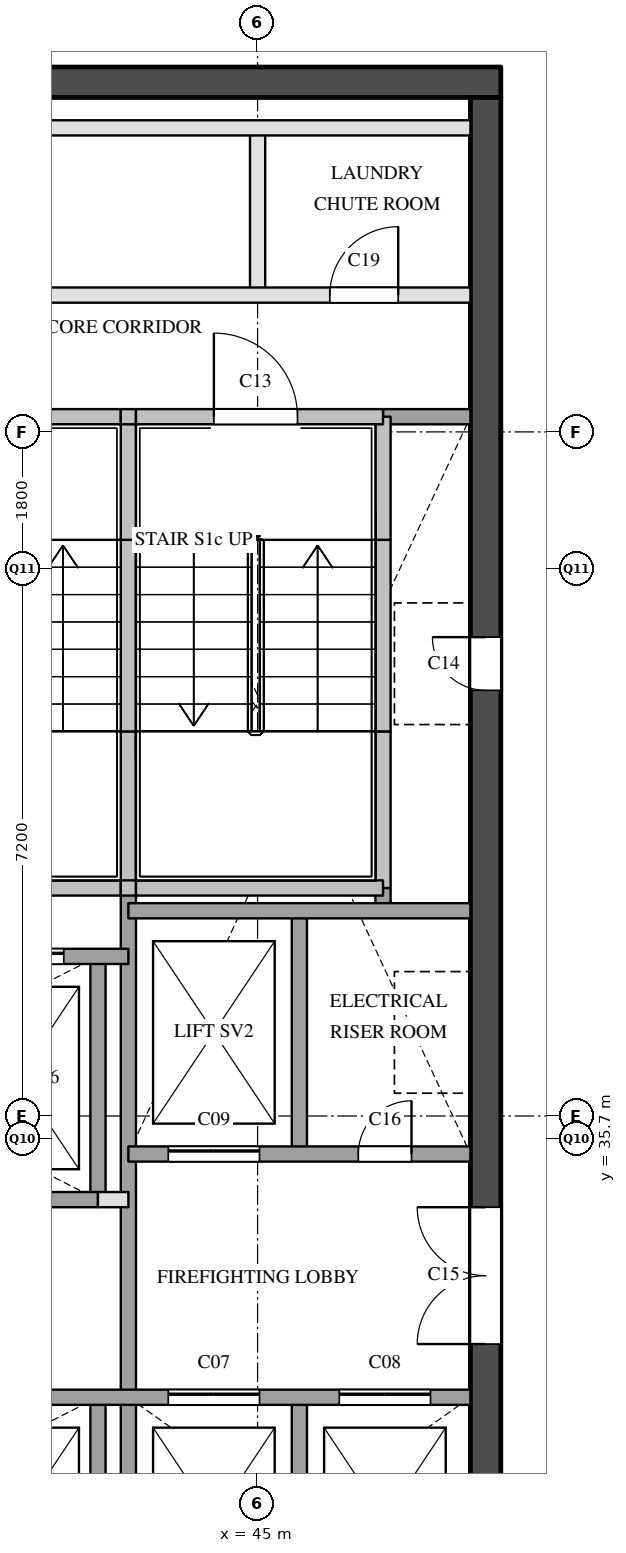
"""IFC4 building model, lengths in metres.
Left out: names, types, materials, properties, quantities, classifications, styles, units other than length and angle.
Written with IfcOpenShell. Run it as: python <this file> out.ifc"""

import sys

from ifc_helpers import new_model, si_unit, direction, frame, frame_2d, origin, place, context, subcontext, project, spatial, rectangle, extrude, element, fill, save


model = new_model("IFC4")
c1 = context("Model", 3, precision=1e-05, world=origin(), true_north=direction((0.0, 1.0)))
c2 = subcontext(c1, "Body", "Model", "MODEL_VIEW")
j1 = project(units=[si_unit("LENGTHUNIT", "METRE"), si_unit("PLANEANGLEUNIT", "RADIAN")], contexts=[c1])
p1 = place(None, origin())
s1 = spatial("IfcSite", under=j1, at=p1, CompositionType="ELEMENT")
p2 = place(p1, origin())
s2 = spatial("IfcBuilding", under=s1, at=p2, CompositionType="ELEMENT")
p3 = place(p2, frame((0.0, 0.0, 285.2)))
s3 = spatial("IfcBuildingStorey", under=s2, at=p3, CompositionType="ELEMENT", Elevation=285.2)
p4 = place(p3, frame((36.2, 49.6, 0.0), z_axis=(0.0, 0.0, 1.0), x_axis=(1.0, 0.0, 0.0)))
e1 = element("IfcWall", 1, at=p4, inside=s3, PredefinedType="SHEAR", context=c2, shape_type="SweptSolid", body=[
    extrude(rectangle(XDim=12.0, YDim=0.4, at=frame_2d((6.0, 0.0))), origin(), (0.0, 0.0, 1.0), 4.7),
])
p5 = place(p3, frame((48.0, 29.1, 0.0), z_axis=(0.0, 0.0, 1.0), x_axis=(0.0, 1.0, 0.0)))
e2 = element("IfcWall", 2, at=p5, inside=s3, PredefinedType="SHEAR", context=c2, shape_type="SweptSolid", body=[
    extrude(rectangle(XDim=20.3, YDim=0.4, at=frame_2d((10.15, 0.0))), origin(), (0.0, 0.0, 1.0), 4.7),
])
p6 = place(p5, frame((12.5, 0.0, 0.0)))
e3 = element("IfcOpeningElement", 3, at=p6, cuts=e2, PredefinedType="OPENING", context=c2, shape_type="SweptSolid", body=[
    extrude(rectangle(XDim=0.7, YDim=2.1, at=frame_2d((0.35, 1.05))), frame((0.0, 0.21, 0.0), z_axis=(0.0, -1.0, 0.0), x_axis=(1.0, 0.0, 0.0)), (0.0, 0.0, 1.0), 0.42),
])
p7 = place(p5, frame((3.9, 0.0, 0.0)))
e4 = element("IfcOpeningElement", 4, at=p7, cuts=e2, PredefinedType="OPENING", context=c2, shape_type="SweptSolid", body=[
    extrude(rectangle(XDim=1.8, YDim=2.1, at=frame_2d((0.9, 1.05))), frame((0.0, 0.21, 0.0), z_axis=(0.0, -1.0, 0.0), x_axis=(1.0, 0.0, 0.0)), (0.0, 0.0, 1.0), 0.42),
])
p8 = place(p3, frame((42.9, 29.1, 0.0), z_axis=(0.0, 0.0, 1.0), x_axis=(0.0, 1.0, 0.0)))
e5 = element("IfcWall", 5, at=p8, inside=s3, PredefinedType="SOLIDWALL", context=c2, shape_type="SweptSolid", body=[
    extrude(rectangle(XDim=3.2, YDim=0.2, at=frame_2d((1.6, 0.0))), origin(), (0.0, 0.0, 1.0), 4.7),
])
p9 = place(p3, frame((42.9, 34.9, 0.0), z_axis=(0.0, 0.0, 1.0), x_axis=(0.0, 1.0, 0.0)))
e6 = element("IfcWall", 6, at=p9, inside=s3, PredefinedType="SOLIDWALL", context=c2, shape_type="SweptSolid", body=[
    extrude(rectangle(XDim=3.2, YDim=0.2, at=frame_2d((1.6, 0.0))), origin(), (0.0, 0.0, 1.0), 4.7),
])
p10 = place(p3, frame((43.3, 29.1, 0.0), z_axis=(0.0, 0.0, 1.0), x_axis=(0.0, 1.0, 0.0)))
e7 = element("IfcWall", 7, at=p10, inside=s3, PredefinedType="SOLIDWALL", context=c2, shape_type="SweptSolid", body=[
    extrude(rectangle(XDim=9.9, YDim=0.2, at=frame_2d((4.95, 0.0))), origin(), (0.0, 0.0, 1.0), 4.7),
])
p11 = place(p3, frame((43.3, 39.0, 0.0), z_axis=(0.0, 0.0, 1.0), x_axis=(0.0, 1.0, 0.0)))
e8 = element("IfcWall", 8, at=p11, inside=s3, PredefinedType="SOLIDWALL", context=c2, shape_type="SweptSolid", body=[
    extrude(rectangle(XDim=2.06, YDim=0.2, at=frame_2d((1.03, 0.0))), origin(), (0.0, 0.0, 1.0), 4.7),
])
p12 = place(p3, frame((43.3, 41.06, 0.0), z_axis=(0.0, 0.0, 1.0), x_axis=(0.0, 1.0, 0.0)))
e9 = element("IfcWall", 9, at=p12, inside=s3, PredefinedType="SOLIDWALL", context=c2, shape_type="SweptSolid", body=[
    extrude(rectangle(XDim=2.52, YDim=0.2, at=frame_2d((1.26, 0.0))), origin(), (0.0, 0.0, 1.0), 4.7),
])
p13 = place(p3, frame((43.3, 43.58, 0.0), z_axis=(0.0, 0.0, 1.0), x_axis=(0.0, 1.0, 0.0)))
e10 = element("IfcWall", 10, at=p13, inside=s3, PredefinedType="SOLIDWALL", context=c2, shape_type="SweptSolid", body=[
    extrude(rectangle(XDim=1.62, YDim=0.2, at=frame_2d((0.81, 0.0))), origin(), (0.0, 0.0, 1.0), 4.7),
])
p14 = place(p3, frame((45.0, 46.8, 0.0), z_axis=(0.0, 0.0, 1.0), x_axis=(0.0, 1.0, 0.0)))
e11 = element("IfcWall", 11, at=p14, inside=s3, PredefinedType="PARTITIONING", context=c2, shape_type="SweptSolid", body=[
    extrude(rectangle(XDim=2.2, YDim=0.2, at=frame_2d((1.1, 0.0))), origin(), (0.0, 0.0, 1.0), 4.7),
])
for number, where, z_axis, x_axis in (
    (12, (45.55, 29.1, 0.0), (0.0, 0.0, 1.0), (0.0, 1.0, 0.0)),
    (13, (45.55, 35.5, 0.0), (0.0, 0.0, 1.0), (0.0, 1.0, 0.0)),
):
    element("IfcWall", number, at=place(p3, frame(where, z_axis=z_axis, x_axis=x_axis)), inside=s3, PredefinedType="SOLIDWALL", context=c2, shape_type="SweptSolid", body=[
        extrude(rectangle(XDim=3.2, YDim=0.2, at=frame_2d((1.6, 0.0))), origin(), (0.0, 0.0, 1.0), 4.7),
    ])
p15 = place(p3, frame((46.65, 38.7, 0.0), z_axis=(0.0, 0.0, 1.0), x_axis=(0.0, 1.0, 0.0)))
e14 = element("IfcWall", 14, at=p15, inside=s3, PredefinedType="SOLIDWALL", context=c2, shape_type="SweptSolid", body=[
    extrude(rectangle(XDim=0.3, YDim=0.2, at=frame_2d((0.15, 0.0))), origin(), (0.0, 0.0, 1.0), 4.7),
])
p16 = place(p3, frame((46.65, 39.0, 0.0), z_axis=(0.0, 0.0, 1.0), x_axis=(0.0, 1.0, 0.0)))
e15 = element("IfcWall", 15, at=p16, inside=s3, PredefinedType="SOLIDWALL", context=c2, shape_type="SweptSolid", body=[
    extrude(rectangle(XDim=2.06, YDim=0.2, at=frame_2d((1.03, 0.0))), origin(), (0.0, 0.0, 1.0), 4.7),
])
p17 = place(p3, frame((46.65, 41.06, 0.0), z_axis=(0.0, 0.0, 1.0), x_axis=(0.0, 1.0, 0.0)))
e16 = element("IfcWall", 16, at=p17, inside=s3, PredefinedType="SOLIDWALL", context=c2, shape_type="SweptSolid", body=[
    extrude(rectangle(XDim=2.52, YDim=0.2, at=frame_2d((1.26, 0.0))), origin(), (0.0, 0.0, 1.0), 4.7),
])
p18 = place(p3, frame((46.65, 43.58, 0.0), z_axis=(0.0, 0.0, 1.0), x_axis=(0.0, 1.0, 0.0)))
e17 = element("IfcWall", 17, at=p18, inside=s3, PredefinedType="SOLIDWALL", context=c2, shape_type="SweptSolid", body=[
    extrude(rectangle(XDim=1.62, YDim=0.2, at=frame_2d((0.81, 0.0))), origin(), (0.0, 0.0, 1.0), 4.7),
])
p19 = place(p3, frame((36.6, 32.3, 0.0), z_axis=(0.0, 0.0, 1.0), x_axis=(1.0, 0.0, 0.0)))
e18 = element("IfcWall", 18, at=p19, inside=s3, PredefinedType="SOLIDWALL", context=c2, shape_type="SweptSolid", body=[
    extrude(rectangle(XDim=11.2, YDim=0.2, at=frame_2d((5.6, 0.0))), origin(), (0.0, 0.0, 1.0), 4.7),
])
p20 = place(p19, frame((7.225, 0.0, 0.0)))
e19 = element("IfcOpeningElement", 19, at=p20, cuts=e18, PredefinedType="OPENING", context=c2, shape_type="SweptSolid", body=[
    extrude(rectangle(XDim=1.2, YDim=2.1, at=frame_2d((0.6, 1.05))), frame((0.0, 0.11, 0.0), z_axis=(0.0, -1.0, 0.0), x_axis=(1.0, 0.0, 0.0)), (0.0, 0.0, 1.0), 0.22),
])
p21 = place(p19, frame((9.475, 0.0, 0.0)))
e20 = element("IfcOpeningElement", 20, at=p21, cuts=e18, PredefinedType="OPENING", context=c2, shape_type="SweptSolid", body=[
    extrude(rectangle(XDim=1.2, YDim=2.1, at=frame_2d((0.6, 1.05))), frame((0.0, 0.11, 0.0), z_axis=(0.0, -1.0, 0.0), x_axis=(1.0, 0.0, 0.0)), (0.0, 0.0, 1.0), 0.22),
])
p22 = place(p3, frame((42.9, 34.9, 0.0), z_axis=(0.0, 0.0, 1.0), x_axis=(1.0, 0.0, 0.0)))
e21 = element("IfcWall", 21, at=p22, inside=s3, PredefinedType="PARTITIONING", context=c2, shape_type="SweptSolid", body=[
    extrude(rectangle(XDim=0.4, YDim=0.2, at=frame_2d((0.2, 0.0))), origin(), (0.0, 0.0, 1.0), 4.7),
])
p23 = place(p3, frame((36.6, 34.9, 0.0), z_axis=(0.0, 0.0, 1.0), x_axis=(1.0, 0.0, 0.0)))
e22 = element("IfcWall", 22, at=p23, inside=s3, PredefinedType="SOLIDWALL", context=c2, shape_type="SweptSolid", body=[
    extrude(rectangle(XDim=6.3, YDim=0.2, at=frame_2d((3.15, 0.0))), origin(), (0.0, 0.0, 1.0), 4.7),
])
p24 = place(p3, frame((43.3, 35.5, 0.0), z_axis=(0.0, 0.0, 1.0), x_axis=(1.0, 0.0, 0.0)))
e23 = element("IfcWall", 23, at=p24, inside=s3, PredefinedType="SOLIDWALL", context=c2, shape_type="SweptSolid", body=[
    extrude(rectangle(XDim=4.5, YDim=0.2, at=frame_2d((2.25, 0.0))), origin(), (0.0, 0.0, 1.0), 4.7),
])
p25 = place(p24, frame((0.525, 0.0, 0.0)))
e24 = element("IfcOpeningElement", 24, at=p25, cuts=e23, PredefinedType="OPENING", context=c2, shape_type="SweptSolid", body=[
    extrude(rectangle(XDim=1.2, YDim=2.1, at=frame_2d((0.6, 1.05))), frame((0.0, 0.11, 0.0), z_axis=(0.0, -1.0, 0.0), x_axis=(1.0, 0.0, 0.0)), (0.0, 0.0, 1.0), 0.22),
])
p26 = place(p24, frame((3.025, 0.0, 0.0)))
e25 = element("IfcOpeningElement", 25, at=p26, cuts=e23, PredefinedType="OPENING", context=c2, shape_type="SweptSolid", body=[
    extrude(rectangle(XDim=0.7, YDim=2.1, at=frame_2d((0.35, 1.05))), frame((0.0, 0.11, 0.0), z_axis=(0.0, -1.0, 0.0), x_axis=(1.0, 0.0, 0.0)), (0.0, 0.0, 1.0), 0.22),
])
p27 = place(p3, frame((36.6, 38.1, 0.0), z_axis=(0.0, 0.0, 1.0), x_axis=(1.0, 0.0, 0.0)))
e26 = element("IfcWall", 26, at=p27, inside=s3, PredefinedType="SOLIDWALL", context=c2, shape_type="SweptSolid", body=[
    extrude(rectangle(XDim=6.7, YDim=0.2, at=frame_2d((3.35, 0.0))), origin(), (0.0, 0.0, 1.0), 4.7),
])
p28 = place(p27, frame((0.45, 0.0, 0.0)))
e27 = element("IfcOpeningElement", 27, at=p28, cuts=e26, PredefinedType="OPENING", context=c2, shape_type="SweptSolid", body=[
    extrude(rectangle(XDim=1.2, YDim=2.1, at=frame_2d((0.6, 1.05))), frame((0.0, 0.11, 0.0), z_axis=(0.0, -1.0, 0.0), x_axis=(1.0, 0.0, 0.0)), (0.0, 0.0, 1.0), 0.22),
])
p29 = place(p27, frame((2.55, 0.0, 0.0)))
e28 = element("IfcOpeningElement", 28, at=p29, cuts=e26, PredefinedType="OPENING", context=c2, shape_type="SweptSolid", body=[
    extrude(rectangle(XDim=1.2, YDim=2.1, at=frame_2d((0.6, 1.05))), frame((0.0, 0.11, 0.0), z_axis=(0.0, -1.0, 0.0), x_axis=(1.0, 0.0, 0.0)), (0.0, 0.0, 1.0), 0.22),
])
p30 = place(p27, frame((4.65, 0.0, 0.0)))
e29 = element("IfcOpeningElement", 29, at=p30, cuts=e26, PredefinedType="OPENING", context=c2, shape_type="SweptSolid", body=[
    extrude(rectangle(XDim=1.2, YDim=2.1, at=frame_2d((0.6, 1.05))), frame((0.0, 0.11, 0.0), z_axis=(0.0, -1.0, 0.0), x_axis=(1.0, 0.0, 0.0)), (0.0, 0.0, 1.0), 0.22),
])
p31 = place(p3, frame((43.3, 38.7, 0.0), z_axis=(0.0, 0.0, 1.0), x_axis=(1.0, 0.0, 0.0)))
e30 = element("IfcWall", 30, at=p31, inside=s3, PredefinedType="SOLIDWALL", context=c2, shape_type="SweptSolid", body=[
    extrude(rectangle(XDim=4.5, YDim=0.2, at=frame_2d((2.25, 0.0))), origin(), (0.0, 0.0, 1.0), 4.7),
])
p32 = place(p3, frame((40.05, 39.0, 0.0), z_axis=(0.0, 0.0, 1.0), x_axis=(1.0, 0.0, 0.0)))
e31 = element("IfcWall", 31, at=p32, inside=s3, PredefinedType="SOLIDWALL", context=c2, shape_type="SweptSolid", body=[
    extrude(rectangle(XDim=3.15, YDim=0.2, at=frame_2d((1.575, 0.0))), origin(), (0.0, 0.0, 1.0), 4.7),
])
p33 = place(p3, frame((43.2, 39.0, 0.0), z_axis=(0.0, 0.0, 1.0), x_axis=(1.0, 0.0, 0.0)))
e32 = element("IfcWall", 32, at=p33, inside=s3, PredefinedType="SOLIDWALL", context=c2, shape_type="SweptSolid", body=[
    extrude(rectangle(XDim=0.2, YDim=0.2, at=frame_2d((0.1, 0.0))), origin(), (0.0, 0.0, 1.0), 4.7),
])
p34 = place(p3, frame((43.4, 39.0, 0.0), z_axis=(0.0, 0.0, 1.0), x_axis=(1.0, 0.0, 0.0)))
e33 = element("IfcWall", 33, at=p34, inside=s3, PredefinedType="SOLIDWALL", context=c2, shape_type="SweptSolid", body=[
    extrude(rectangle(XDim=3.25, YDim=0.2, at=frame_2d((1.625, 0.0))), origin(), (0.0, 0.0, 1.0), 4.7),
])
p35 = place(p3, frame((46.65, 45.2, 0.0), z_axis=(0.0, 0.0, 1.0), x_axis=(1.0, 0.0, 0.0)))
e34 = element("IfcWall", 34, at=p35, inside=s3, PredefinedType="SOLIDWALL", context=c2, shape_type="SweptSolid", body=[
    extrude(rectangle(XDim=1.15, YDim=0.2, at=frame_2d((0.575, 0.0))), origin(), (0.0, 0.0, 1.0), 4.7),
])
p36 = place(p3, frame((40.05, 45.2, 0.0), z_axis=(0.0, 0.0, 1.0), x_axis=(1.0, 0.0, 0.0)))
e35 = element("IfcWall", 35, at=p36, inside=s3, PredefinedType="SOLIDWALL", context=c2, shape_type="SweptSolid", body=[
    extrude(rectangle(XDim=3.15, YDim=0.2, at=frame_2d((1.575, 0.0))), origin(), (0.0, 0.0, 1.0), 4.7),
])
p37 = place(p36, frame((1.025, 0.0, 0.0)))
e36 = element("IfcOpeningElement", 36, at=p37, cuts=e35, PredefinedType="OPENING", context=c2, shape_type="SweptSolid", body=[
    extrude(rectangle(XDim=1.1, YDim=2.1, at=frame_2d((0.55, 1.05))), frame((0.0, 0.11, 0.0), z_axis=(0.0, -1.0, 0.0), x_axis=(1.0, 0.0, 0.0)), (0.0, 0.0, 1.0), 0.22),
])
p38 = place(p3, frame((43.2, 45.2, 0.0), z_axis=(0.0, 0.0, 1.0), x_axis=(1.0, 0.0, 0.0)))
e37 = element("IfcWall", 37, at=p38, inside=s3, PredefinedType="SOLIDWALL", context=c2, shape_type="SweptSolid", body=[
    extrude(rectangle(XDim=0.2, YDim=0.2, at=frame_2d((0.1, 0.0))), origin(), (0.0, 0.0, 1.0), 4.7),
])
p39 = place(p3, frame((43.4, 45.2, 0.0), z_axis=(0.0, 0.0, 1.0), x_axis=(1.0, 0.0, 0.0)))
e38 = element("IfcWall", 38, at=p39, inside=s3, PredefinedType="SOLIDWALL", context=c2, shape_type="SweptSolid", body=[
    extrude(rectangle(XDim=3.25, YDim=0.2, at=frame_2d((1.625, 0.0))), origin(), (0.0, 0.0, 1.0), 4.7),
])
p40 = place(p39, frame((1.025, 0.0, 0.0)))
e39 = element("IfcOpeningElement", 39, at=p40, cuts=e38, PredefinedType="OPENING", context=c2, shape_type="SweptSolid", body=[
    extrude(rectangle(XDim=1.1, YDim=2.1, at=frame_2d((0.55, 1.05))), frame((0.0, 0.11, 0.0), z_axis=(0.0, -1.0, 0.0), x_axis=(1.0, 0.0, 0.0)), (0.0, 0.0, 1.0), 0.22),
])
p41 = place(p3, frame((36.6, 46.8, 0.0), z_axis=(0.0, 0.0, 1.0), x_axis=(1.0, 0.0, 0.0)))
e40 = element("IfcWall", 40, at=p41, inside=s3, PredefinedType="PARTITIONING", context=c2, shape_type="SweptSolid", body=[
    extrude(rectangle(XDim=11.2, YDim=0.2, at=frame_2d((5.6, 0.0))), origin(), (0.0, 0.0, 1.0), 4.7),
])
p42 = place(p41, frame((3.75, 0.0, 0.0)))
e41 = element("IfcOpeningElement", 41, at=p42, cuts=e40, PredefinedType="OPENING", context=c2, shape_type="SweptSolid", body=[
    extrude(rectangle(XDim=0.9, YDim=2.1, at=frame_2d((0.45, 1.05))), frame((0.0, 0.11, 0.0), z_axis=(0.0, -1.0, 0.0), x_axis=(1.0, 0.0, 0.0)), (0.0, 0.0, 1.0), 0.22),
])
p43 = place(p41, frame((9.35, 0.0, 0.0)))
e42 = element("IfcOpeningElement", 42, at=p43, cuts=e40, PredefinedType="OPENING", context=c2, shape_type="SweptSolid", body=[
    extrude(rectangle(XDim=0.9, YDim=2.1, at=frame_2d((0.45, 1.05))), frame((0.0, 0.11, 0.0), z_axis=(0.0, -1.0, 0.0), x_axis=(1.0, 0.0, 0.0)), (0.0, 0.0, 1.0), 0.22),
])
p44 = place(p3, frame((36.6, 49.0, 0.0), z_axis=(0.0, 0.0, 1.0), x_axis=(1.0, 0.0, 0.0)))
e43 = element("IfcWall", 43, at=p44, inside=s3, PredefinedType="PARTITIONING", context=c2, shape_type="SweptSolid", body=[
    extrude(rectangle(XDim=11.2, YDim=0.2, at=frame_2d((5.6, 0.0))), origin(), (0.0, 0.0, 1.0), 4.7),
])
p45 = place(p30, origin())
e44 = element("IfcDoor", 44, at=p45, inside=s3, OperationType="SLIDING_TO_LEFT", PredefinedType="DOOR", context=c2, shape_type="SweptSolid", body=[
    extrude(rectangle(XDim=1.2, YDim=2.1, at=frame_2d((0.6, 1.05))), frame((0.0, 0.025, 0.0), z_axis=(0.0, -1.0, 0.0), x_axis=(1.0, 0.0, 0.0)), (0.0, 0.0, 1.0), 0.05),
])
fill(e29, e44)
p46 = place(p20, origin())
e45 = element("IfcDoor", 45, at=p46, inside=s3, OperationType="SLIDING_TO_LEFT", PredefinedType="DOOR", context=c2, shape_type="SweptSolid", body=[
    extrude(rectangle(XDim=1.2, YDim=2.1, at=frame_2d((0.6, 1.05))), frame((0.0, 0.025, 0.0), z_axis=(0.0, -1.0, 0.0), x_axis=(1.0, 0.0, 0.0)), (0.0, 0.0, 1.0), 0.05),
])
fill(e19, e45)
p47 = place(p21, origin())
e46 = element("IfcDoor", 46, at=p47, inside=s3, OperationType="SLIDING_TO_LEFT", PredefinedType="DOOR", context=c2, shape_type="SweptSolid", body=[
    extrude(rectangle(XDim=1.2, YDim=2.1, at=frame_2d((0.6, 1.05))), frame((0.0, 0.025, 0.0), z_axis=(0.0, -1.0, 0.0), x_axis=(1.0, 0.0, 0.0)), (0.0, 0.0, 1.0), 0.05),
])
fill(e20, e46)
p48 = place(p25, origin())
e47 = element("IfcDoor", 47, at=p48, inside=s3, OperationType="SLIDING_TO_LEFT", PredefinedType="DOOR", context=c2, shape_type="SweptSolid", body=[
    extrude(rectangle(XDim=1.2, YDim=2.1, at=frame_2d((0.6, 1.05))), frame((0.0, 0.025, 0.0), z_axis=(0.0, -1.0, 0.0), x_axis=(1.0, 0.0, 0.0)), (0.0, 0.0, 1.0), 0.05),
])
fill(e24, e47)
p49 = place(p40, origin())
e48 = element("IfcDoor", 48, at=p49, inside=s3, OperationType="SINGLE_SWING_LEFT", PredefinedType="DOOR", context=c2, shape_type="SweptSolid", body=[
    extrude(rectangle(XDim=1.1, YDim=2.1, at=frame_2d((0.55, 1.05))), frame((0.0, 0.025, 0.0), z_axis=(0.0, -1.0, 0.0), x_axis=(1.0, 0.0, 0.0)), (0.0, 0.0, 1.0), 0.05),
])
fill(e39, e48)
p50 = place(p6, origin())
e49 = element("IfcDoor", 49, at=p50, inside=s3, OperationType="SINGLE_SWING_RIGHT", PredefinedType="DOOR", context=c2, shape_type="SweptSolid", body=[
    extrude(rectangle(XDim=0.7, YDim=2.1, at=frame_2d((0.35, 1.05))), frame((0.0, 0.025, 0.0), z_axis=(0.0, -1.0, 0.0), x_axis=(1.0, 0.0, 0.0)), (0.0, 0.0, 1.0), 0.05),
])
fill(e3, e49)
p51 = place(p7, origin())
e50 = element("IfcDoor", 50, at=p51, inside=s3, OperationType="DOUBLE_DOOR_SINGLE_SWING", PredefinedType="DOOR", context=c2, shape_type="SweptSolid", body=[
    extrude(rectangle(XDim=1.8, YDim=2.1, at=frame_2d((0.9, 1.05))), frame((0.0, 0.025, 0.0), z_axis=(0.0, -1.0, 0.0), x_axis=(1.0, 0.0, 0.0)), (0.0, 0.0, 1.0), 0.05),
])
fill(e4, e50)
p52 = place(p26, origin())
e51 = element("IfcDoor", 51, at=p52, inside=s3, OperationType="SINGLE_SWING_RIGHT", PredefinedType="DOOR", context=c2, shape_type="SweptSolid", body=[
    extrude(rectangle(XDim=0.7, YDim=2.1, at=frame_2d((0.35, 1.05))), frame((0.0, 0.025, 0.0), z_axis=(0.0, -1.0, 0.0), x_axis=(1.0, 0.0, 0.0)), (0.0, 0.0, 1.0), 0.05),
])
fill(e25, e51)
p53 = place(p43, origin())
e52 = element("IfcDoor", 52, at=p53, inside=s3, OperationType="SINGLE_SWING_RIGHT", PredefinedType="DOOR", context=c2, shape_type="SweptSolid", body=[
    extrude(rectangle(XDim=0.9, YDim=2.1, at=frame_2d((0.45, 1.05))), frame((0.0, 0.025, 0.0), z_axis=(0.0, -1.0, 0.0), x_axis=(1.0, 0.0, 0.0)), (0.0, 0.0, 1.0), 0.05),
])
fill(e42, e52)
save(model, sys.argv[1])
